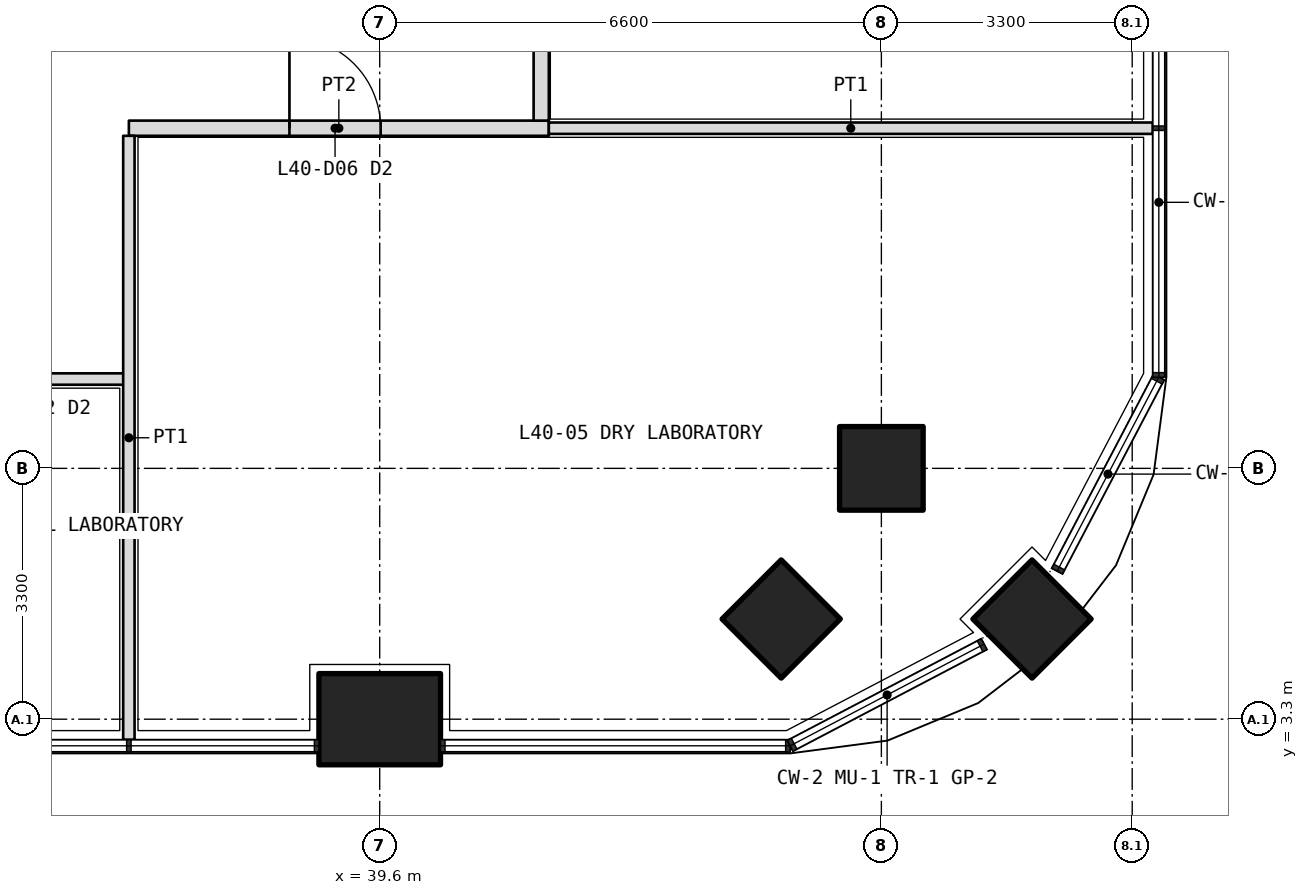
"""IFC4 building model, lengths in metres.
Left out: names, types, materials, properties, quantities, classifications, styles, units other than length and angle.
Written with IfcOpenShell. Run it as: python <this file> out.ifc"""

import sys

from ifc_helpers import new_model, si_unit, direction, frame, frame_2d, origin, origin_2d, place, context, subcontext, project, spatial, rectangle, extrude, element, fill, save


model = new_model("IFC4")
c1 = context("Model", 3, precision=1e-05, world=origin(), true_north=direction((0.0, 1.0)))
c2 = subcontext(c1, "Body", "Model", "MODEL_VIEW")
j1 = project(units=[si_unit("LENGTHUNIT", "METRE"), si_unit("PLANEANGLEUNIT", "RADIAN")], contexts=[c1])
p1 = place(None, origin())
s1 = spatial("IfcSite", under=j1, at=p1, CompositionType="ELEMENT")
p2 = place(p1, origin())
s2 = spatial("IfcBuilding", under=s1, at=p2, CompositionType="ELEMENT")
p3 = place(p2, frame((0.0, 0.0, 176.7)))
s3 = spatial("IfcBuildingStorey", under=s2, at=p3, CompositionType="ELEMENT", Elevation=176.7)
p4 = place(p3, frame((48.182, 4.618, 0.0), z_axis=(0.0, 0.0, 1.0), x_axis=(0.707106781187, 0.707106781187, 0.0)))
e1 = element("IfcColumn", 1, at=p4, inside=s3, PredefinedType="COLUMN", context=c2, shape_type="SweptSolid", body=[
    extrude(rectangle(XDim=1.1, YDim=1.1, at=origin_2d()), origin(), (0.0, 0.0, 1.0), 4.2),
])
p5 = place(p3, frame((39.6, 3.3, 0.0), z_axis=(0.0, 0.0, 1.0), x_axis=(1.0, 0.0, 0.0)))
e2 = element("IfcColumn", 2, at=p5, inside=s3, PredefinedType="COLUMN", context=c2, shape_type="SweptSolid", body=[
    extrude(rectangle(XDim=1.6, YDim=1.2, at=origin_2d()), origin(), (0.0, 0.0, 1.0), 4.2),
])
for number, where, z_axis, x_axis in (
    (3, (46.2, 6.6, 0.0), (0.0, 0.0, 1.0), (1.0, 0.0, 0.0)),
    (4, (44.882, 4.618, 0.0), (0.0, 0.0, 1.0), (0.707, 0.707, 0.0)),
):
    element("IfcColumn", number, at=place(p3, frame(where, z_axis=z_axis, x_axis=x_axis)), inside=s3, PredefinedType="COLUMN", context=c2, shape_type="SweptSolid", body=[
        extrude(rectangle(XDim=1.1, YDim=1.1, at=origin_2d()), origin(), (0.0, 0.0, 1.0), 4.2),
    ])
p6 = place(p3, frame((36.3, 11.075, 0.0), z_axis=(0.0, 0.0, 1.0), x_axis=(1.0, 0.0, 0.0)))
e5 = element("IfcWall", 5, at=p6, inside=s3, PredefinedType="PARTITIONING", context=c2, shape_type="SweptSolid", body=[
    extrude(rectangle(XDim=5.525, YDim=0.2, at=frame_2d((2.762, 0.0))), origin(), (0.0, 0.0, 1.0), 2.85),
])
p7 = place(p6, frame((2.113, 0.0, 0.0)))
e6 = element("IfcOpeningElement", 6, at=p7, cuts=e5, PredefinedType="OPENING", context=c2, shape_type="SweptSolid", body=[
    extrude(rectangle(XDim=1.2, YDim=2.1, at=frame_2d((0.6, 1.05))), frame((0.0, 0.11, 0.0), z_axis=(0.0, -1.0, 0.0), x_axis=(1.0, 0.0, 0.0)), (0.0, 0.0, 1.0), 0.22),
])
p8 = place(p3, frame((41.725, 11.175, 0.0), z_axis=(0.0, 0.0, 1.0), x_axis=(0.0, 1.0, 0.0)))
e7 = element("IfcWall", 7, at=p8, inside=s3, PredefinedType="PARTITIONING", context=c2, shape_type="SweptSolid", body=[
    extrude(rectangle(XDim=23.85, YDim=0.2, at=frame_2d((11.925, 0.0))), origin(), (0.0, 0.0, 1.0), 2.85),
])
p9 = place(p8, frame((2.113, 0.0, 0.0)))
e8 = element("IfcOpeningElement", 8, at=p9, cuts=e7, PredefinedType="OPENING", context=c2, shape_type="SweptSolid", body=[
    extrude(rectangle(XDim=1.0, YDim=2.1, at=frame_2d((0.5, 1.05))), frame((0.0, 0.11, 0.0), z_axis=(0.0, -1.0, 0.0), x_axis=(1.0, 0.0, 0.0)), (0.0, 0.0, 1.0), 0.22),
])
p10 = place(p8, frame((6.475, 0.0, 0.0)))
e9 = element("IfcOpeningElement", 9, at=p10, cuts=e7, PredefinedType="OPENING", context=c2, shape_type="SweptSolid", body=[
    extrude(rectangle(XDim=1.0, YDim=2.1, at=frame_2d((0.5, 1.05))), frame((0.0, 0.11, 0.0), z_axis=(0.0, -1.0, 0.0), x_axis=(1.0, 0.0, 0.0)), (0.0, 0.0, 1.0), 0.22),
])
p11 = place(p8, frame((9.625, 0.0, 0.0)))
e10 = element("IfcOpeningElement", 10, at=p11, cuts=e7, PredefinedType="OPENING", context=c2, shape_type="SweptSolid", body=[
    extrude(rectangle(XDim=1.0, YDim=2.1, at=frame_2d((0.5, 1.05))), frame((0.0, 0.11, 0.0), z_axis=(0.0, -1.0, 0.0), x_axis=(1.0, 0.0, 0.0)), (0.0, 0.0, 1.0), 0.22),
])
p12 = place(p8, frame((12.975, 0.0, 0.0)))
e11 = element("IfcOpeningElement", 11, at=p12, cuts=e7, PredefinedType="OPENING", context=c2, shape_type="SweptSolid", body=[
    extrude(rectangle(XDim=0.9, YDim=2.1, at=frame_2d((0.45, 1.05))), frame((0.0, 0.11, 0.0), z_axis=(0.0, -1.0, 0.0), x_axis=(1.0, 0.0, 0.0)), (0.0, 0.0, 1.0), 0.22),
])
p13 = place(p8, frame((16.375, 0.0, 0.0)))
e12 = element("IfcOpeningElement", 12, at=p13, cuts=e7, PredefinedType="OPENING", context=c2, shape_type="SweptSolid", body=[
    extrude(rectangle(XDim=1.0, YDim=2.1, at=frame_2d((0.5, 1.05))), frame((0.0, 0.11, 0.0), z_axis=(0.0, -1.0, 0.0), x_axis=(1.0, 0.0, 0.0)), (0.0, 0.0, 1.0), 0.22),
])
p14 = place(p8, frame((19.575, 0.0, 0.0)))
e13 = element("IfcOpeningElement", 13, at=p14, cuts=e7, PredefinedType="OPENING", context=c2, shape_type="SweptSolid", body=[
    extrude(rectangle(XDim=1.2, YDim=2.1, at=frame_2d((0.6, 1.05))), frame((0.0, 0.11, 0.0), z_axis=(0.0, -1.0, 0.0), x_axis=(1.0, 0.0, 0.0)), (0.0, 0.0, 1.0), 0.22),
])
p15 = place(p8, frame((22.288, 0.0, 0.0)))
e14 = element("IfcOpeningElement", 14, at=p15, cuts=e7, PredefinedType="OPENING", context=c2, shape_type="SweptSolid", body=[
    extrude(rectangle(XDim=1.2, YDim=2.1, at=frame_2d((0.6, 1.05))), frame((0.0, 0.11, 0.0), z_axis=(0.0, -1.0, 0.0), x_axis=(1.0, 0.0, 0.0)), (0.0, 0.0, 1.0), 0.22),
])
p16 = place(p3, frame((49.77, 11.075, 0.0), z_axis=(0.0, 0.0, 1.0), x_axis=(-1.0, 0.0, 0.0)))
e15 = element("IfcWall", 15, at=p16, inside=s3, PredefinedType="PARTITIONING", context=c2, shape_type="SweptSolid", body=[
    extrude(rectangle(XDim=7.945, YDim=0.15, at=frame_2d((3.973, 0.0))), origin(), (0.0, 0.0, 1.0), 2.7),
])
p17 = place(p3, frame((33.0, 7.775, 0.0), z_axis=(0.0, 0.0, 1.0), x_axis=(1.0, 0.0, 0.0)))
e16 = element("IfcWall", 16, at=p17, inside=s3, PredefinedType="PARTITIONING", context=c2, shape_type="SweptSolid", body=[
    extrude(rectangle(XDim=3.3, YDim=0.15, at=frame_2d((1.65, 0.0))), origin(), (0.0, 0.0, 1.0), 2.85),
])
p18 = place(p17, frame((1.05, 0.0, 0.0)))
e17 = element("IfcOpeningElement", 17, at=p18, cuts=e16, PredefinedType="OPENING", context=c2, shape_type="SweptSolid", body=[
    extrude(rectangle(XDim=1.2, YDim=2.1, at=frame_2d((0.6, 1.05))), frame((0.0, 0.085, 0.0), z_axis=(0.0, -1.0, 0.0), x_axis=(1.0, 0.0, 0.0)), (0.0, 0.0, 1.0), 0.17),
])
p19 = place(p3, frame((36.3, 3.03, 0.0), z_axis=(0.0, 0.0, 1.0), x_axis=(0.0, 1.0, 0.0)))
e18 = element("IfcWall", 18, at=p19, inside=s3, PredefinedType="PARTITIONING", context=c2, shape_type="SweptSolid", body=[
    extrude(rectangle(XDim=7.945, YDim=0.15, at=frame_2d((3.973, 0.0))), origin(), (0.0, 0.0, 1.0), 2.7),
])
p20 = place(p7, origin())
e19 = element("IfcDoor", 19, at=p20, inside=s3, OperationType="DOUBLE_DOOR_SINGLE_SWING", PredefinedType="DOOR", context=c2, shape_type="SweptSolid", body=[
    extrude(rectangle(XDim=1.2, YDim=2.1, at=frame_2d((0.6, 1.05))), frame((0.0, 0.025, 0.0), z_axis=(0.0, -1.0, 0.0), x_axis=(1.0, 0.0, 0.0)), (0.0, 0.0, 1.0), 0.05),
])
fill(e6, e19)
save(model, sys.argv[1])
